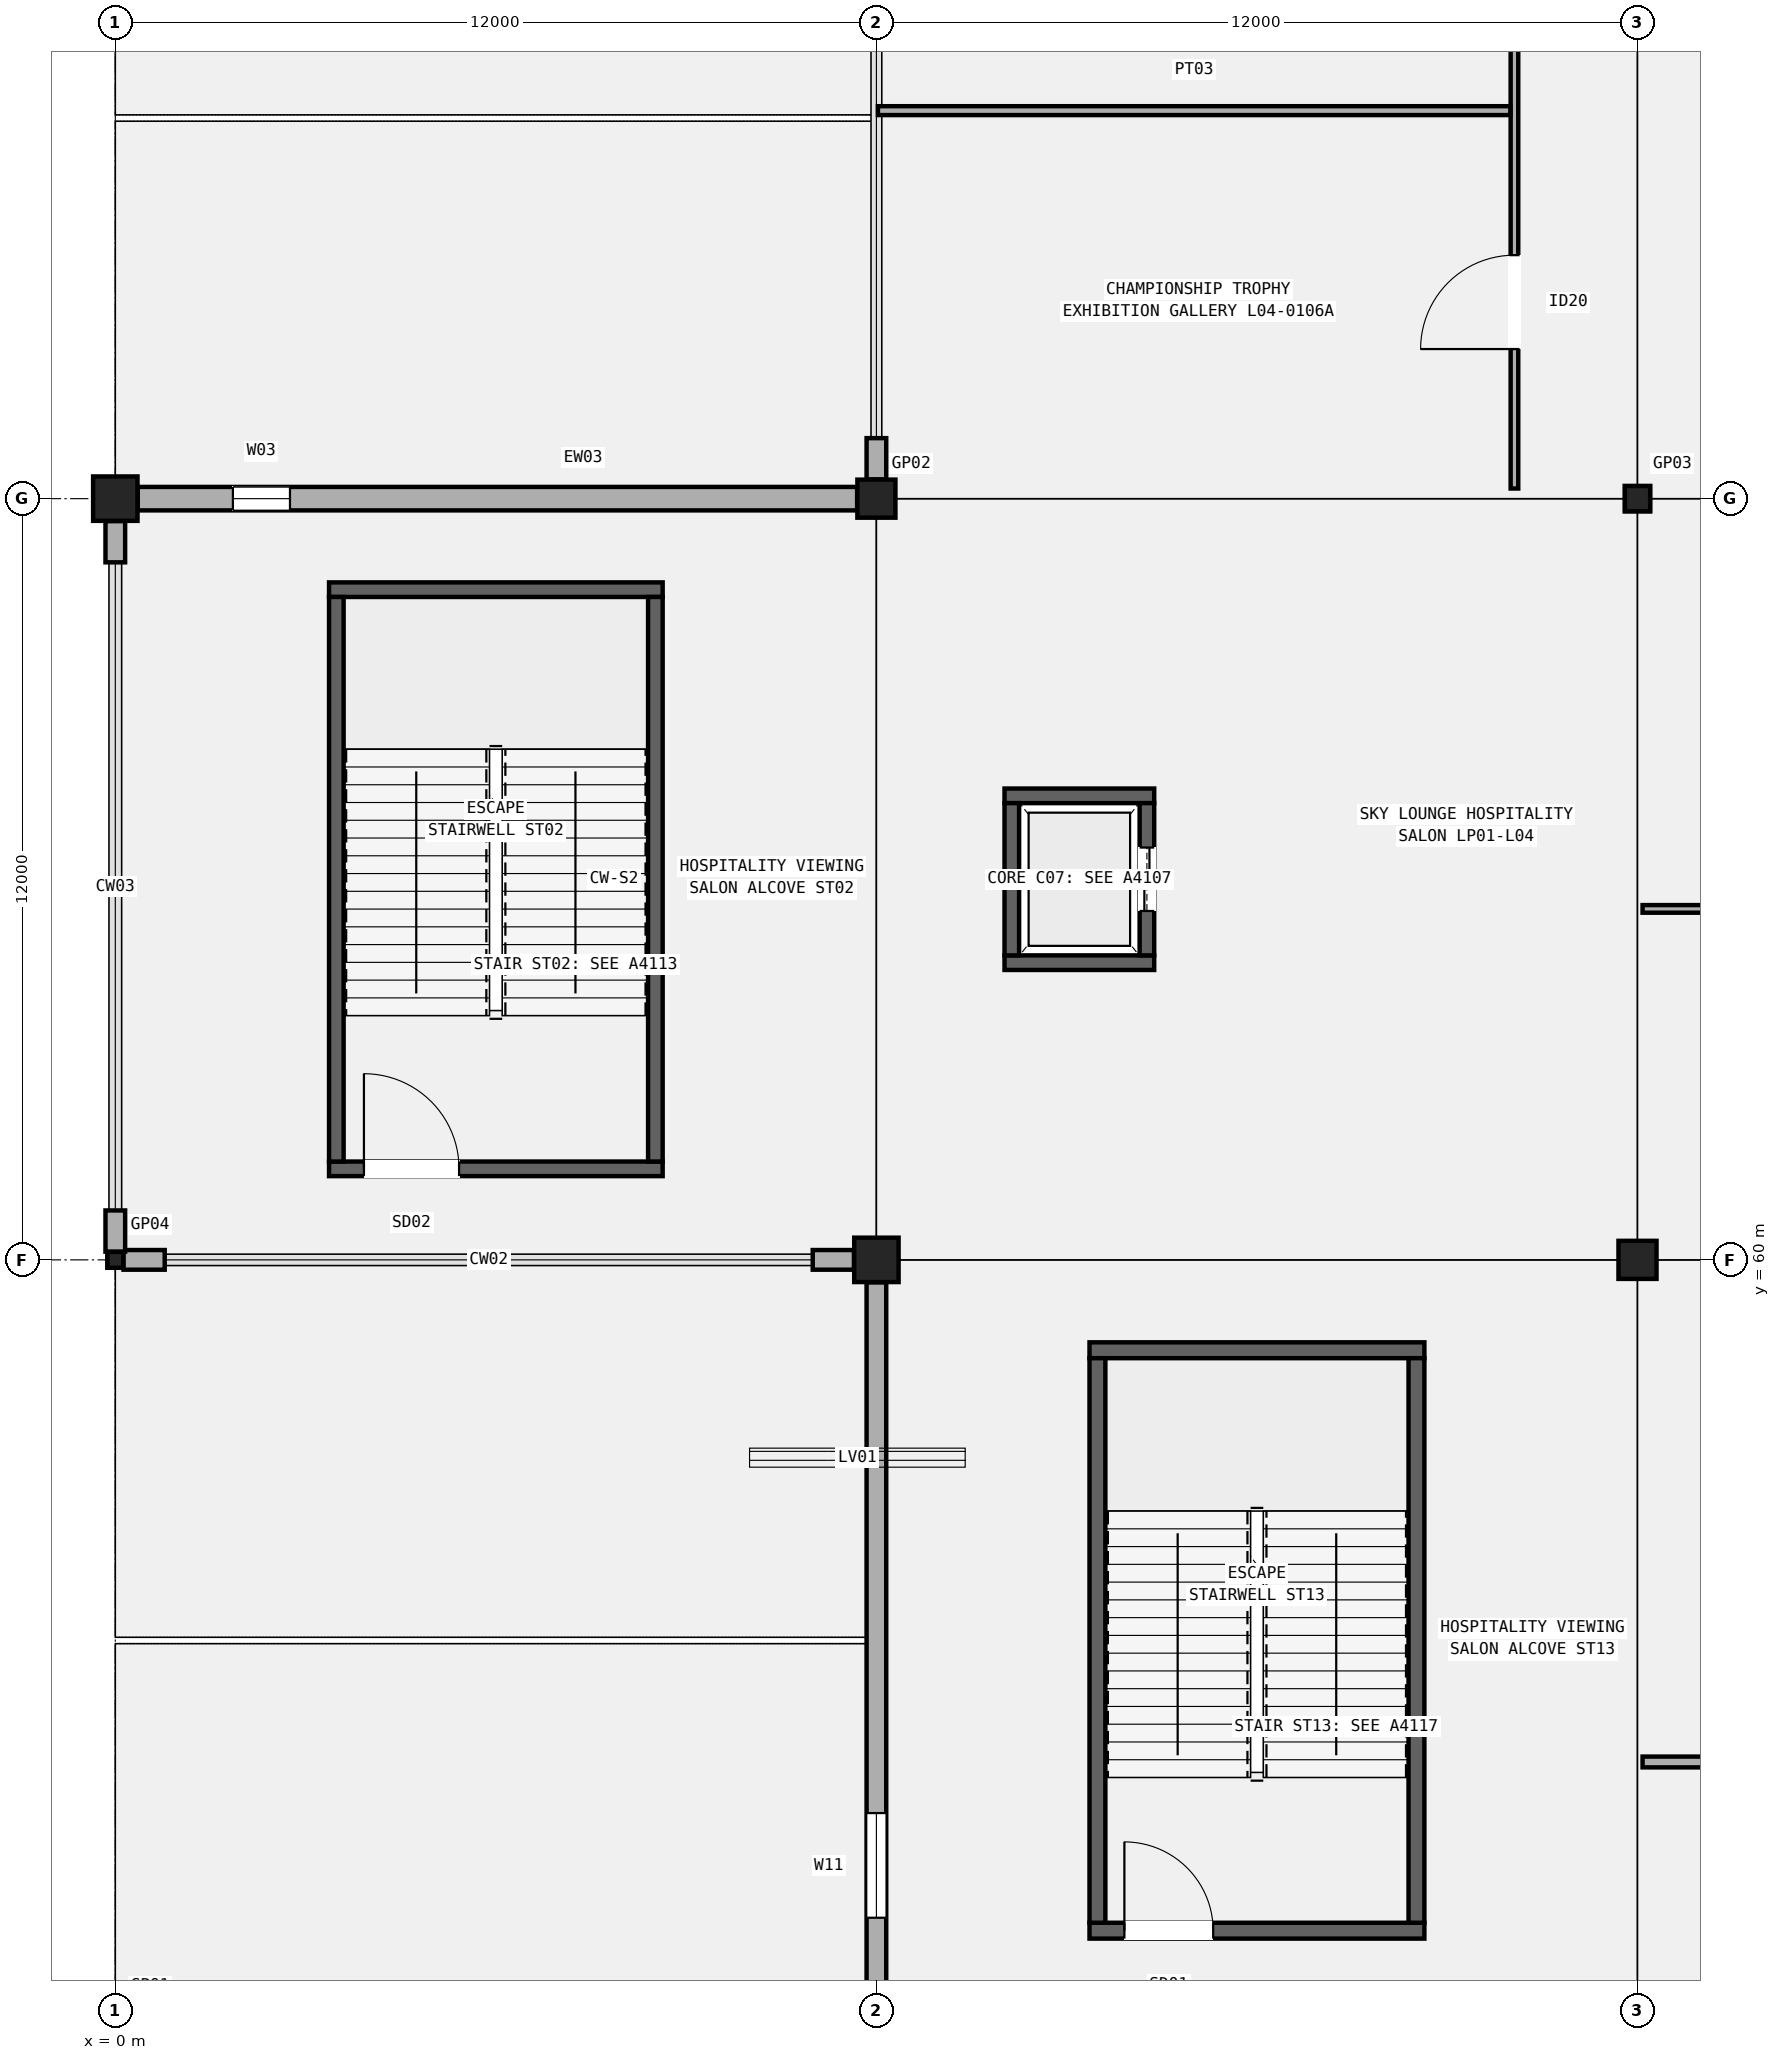
"""IFC4 building model, lengths in metres.
Left out: names, types, materials, properties, quantities, classifications, styles, units other than length and angle.
Written with IfcOpenShell. Run it as: python <this file> out.ifc"""

import sys

from ifc_helpers import new_model, si_unit, direction, frame, frame_2d, origin, origin_2d, place, context, subcontext, project, spatial, rectangle, hollow_rectangle, extrude, element, fill, save


model = new_model("IFC4")
c1 = context("Model", 3, precision=1e-05, world=origin(), true_north=direction((0.0, 1.0)))
c2 = subcontext(c1, "Body", "Model", "MODEL_VIEW")
j1 = project(units=[si_unit("LENGTHUNIT", "METRE"), si_unit("PLANEANGLEUNIT", "RADIAN")], contexts=[c1])
p1 = place(None, origin())
s1 = spatial("IfcSite", under=j1, at=p1, CompositionType="ELEMENT")
p2 = place(p1, origin())
s2 = spatial("IfcBuilding", under=s1, at=p2, CompositionType="ELEMENT")
p3 = place(p2, frame((0.0, 0.0, 20.4)))
s3 = spatial("IfcBuildingStorey", under=s2, at=p3, CompositionType="ELEMENT", Elevation=20.4)
p4 = place(p3, frame((0.0, 60.0, 0.0), z_axis=(0.0, 0.0, 1.0), x_axis=(1.0, 0.0, 0.0)))
e1 = element("IfcColumn", 1, at=p4, inside=s3, PredefinedType="COLUMN", context=c2, shape_type="SweptSolid", body=[
    extrude(hollow_rectangle(XDim=0.25, YDim=0.25, WallThickness=0.012, InnerFilletRadius=0.012, OuterFilletRadius=0.024, at=origin_2d()), origin(), (0.0, 0.0, 1.0), 5.4),
])
for number, where, z_axis, x_axis in (
    (2, (0.0, 72.0, 0.0), (0.0, 0.0, 1.0), (1.0, 0.0, 0.0)),
    (3, (12.0, 60.0, 0.0), (0.0, 0.0, 1.0), (1.0, 0.0, 0.0)),
):
    element("IfcColumn", number, at=place(p3, frame(where, z_axis=z_axis, x_axis=x_axis)), inside=s3, PredefinedType="COLUMN", context=c2, shape_type="SweptSolid", body=[
        extrude(rectangle(XDim=0.7, YDim=0.7, at=origin_2d()), origin(), (0.0, 0.0, 1.0), 5.4),
    ])
for number, where, z_axis, x_axis in (
    (4, (12.0, 72.0, 0.0), (0.0, 0.0, 1.0), (1.0, 0.0, 0.0)),
    (5, (24.0, 60.0, 0.0), (0.0, 0.0, 1.0), (1.0, 0.0, 0.0)),
):
    element("IfcColumn", number, at=place(p3, frame(where, z_axis=z_axis, x_axis=x_axis)), inside=s3, PredefinedType="COLUMN", context=c2, shape_type="SweptSolid", body=[
        extrude(rectangle(XDim=0.6, YDim=0.6, at=origin_2d()), origin(), (0.0, 0.0, 1.0), 5.4),
    ])
p5 = place(p3, frame((24.0, 72.0, 0.0), z_axis=(0.0, 0.0, 1.0), x_axis=(1.0, 0.0, 0.0)))
e6 = element("IfcColumn", 6, at=p5, inside=s3, PredefinedType="COLUMN", context=c2, shape_type="SweptSolid", body=[
    extrude(hollow_rectangle(XDim=0.4, YDim=0.4, WallThickness=0.016, InnerFilletRadius=0.016, OuterFilletRadius=0.032, at=origin_2d()), origin(), (0.0, 0.0, 1.0), 5.4),
])
p6 = place(p3, frame((0.129, 60.0, 0.0), z_axis=(0.0, 0.0, 1.0), x_axis=(1.0, 0.0, 0.0)))
e7 = element("IfcWall", 7, at=p6, inside=s3, PredefinedType="SOLIDWALL", context=c2, shape_type="SweptSolid", body=[
    extrude(rectangle(XDim=0.65, YDim=0.31, at=frame_2d((0.325, 0.0))), origin(), (0.0, 0.0, 1.0), 4.592),
])
p7 = place(p3, frame((10.996, 60.0, 0.0), z_axis=(0.0, 0.0, 1.0), x_axis=(1.0, 0.0, 0.0)))
e8 = element("IfcWall", 8, at=p7, inside=s3, PredefinedType="SOLIDWALL", context=c2, shape_type="SweptSolid", body=[
    extrude(rectangle(XDim=0.65, YDim=0.31, at=frame_2d((0.325, 0.0))), origin(), (0.0, 0.0, 1.0), 4.592),
])
p8 = place(p3, frame((0.354, 72.0, 0.0), z_axis=(0.0, 0.0, 1.0), x_axis=(1.0, 0.0, 0.0)))
e9 = element("IfcWall", 9, at=p8, inside=s3, PredefinedType="SOLIDWALL", context=c2, shape_type="SweptSolid", body=[
    extrude(rectangle(XDim=11.342, YDim=0.37, at=frame_2d((5.671, 0.0))), origin(), (0.0, 0.0, 1.0), 4.48),
])
p9 = place(p8, frame((1.5, 0.0, 0.95)))
e10 = element("IfcOpeningElement", 10, at=p9, cuts=e9, PredefinedType="OPENING", context=c2, shape_type="SweptSolid", body=[
    extrude(rectangle(XDim=0.9, YDim=2.7, at=frame_2d((0.45, 1.35))), frame((0.0, 0.195, 0.0), z_axis=(0.0, -1.0, 0.0), x_axis=(1.0, 0.0, 0.0)), (0.0, 0.0, 1.0), 0.39),
])
p10 = place(p3, frame((0.0, 60.129, 0.0), z_axis=(0.0, 0.0, 1.0), x_axis=(0.0, 1.0, 0.0)))
e11 = element("IfcWall", 11, at=p10, inside=s3, PredefinedType="SOLIDWALL", context=c2, shape_type="SweptSolid", body=[
    extrude(rectangle(XDim=0.65, YDim=0.31, at=frame_2d((0.325, 0.0))), origin(), (0.0, 0.0, 1.0), 4.592),
])
p11 = place(p3, frame((0.0, 70.996, 0.0), z_axis=(0.0, 0.0, 1.0), x_axis=(0.0, 1.0, 0.0)))
e12 = element("IfcWall", 12, at=p11, inside=s3, PredefinedType="SOLIDWALL", context=c2, shape_type="SweptSolid", body=[
    extrude(rectangle(XDim=0.65, YDim=0.31, at=frame_2d((0.325, 0.0))), origin(), (0.0, 0.0, 1.0), 4.592),
])
p12 = place(p3, frame((12.0, 48.129, 0.0), z_axis=(0.0, 0.0, 1.0), x_axis=(0.0, 1.0, 0.0)))
e13 = element("IfcWall", 13, at=p12, inside=s3, PredefinedType="SOLIDWALL", context=c2, shape_type="SweptSolid", body=[
    extrude(rectangle(XDim=11.517, YDim=0.31, at=frame_2d((5.759, 0.0))), origin(), (0.0, 0.0, 1.0), 4.592),
])
p13 = place(p12, frame((1.5, 0.0, 0.95)))
e14 = element("IfcOpeningElement", 14, at=p13, cuts=e13, PredefinedType="OPENING", context=c2, shape_type="SweptSolid", body=[
    extrude(rectangle(XDim=1.65, YDim=2.05, at=frame_2d((0.825, 1.025))), frame((0.0, 0.165, 0.0), z_axis=(0.0, -1.0, 0.0), x_axis=(1.0, 0.0, 0.0)), (0.0, 0.0, 1.0), 0.33),
])
p14 = place(p3, frame((12.0, 72.304, 0.0), z_axis=(0.0, 0.0, 1.0), x_axis=(0.0, 1.0, 0.0)))
e15 = element("IfcWall", 15, at=p14, inside=s3, PredefinedType="SOLIDWALL", context=c2, shape_type="SweptSolid", body=[
    extrude(rectangle(XDim=0.65, YDim=0.31, at=frame_2d((0.325, 0.0))), origin(), (0.0, 0.0, 1.0), 4.58),
])
p15 = place(p3, frame((3.37, 61.435, 0.0), z_axis=(0.0, 0.0, 1.0), x_axis=(1.0, 0.0, 0.0)))
e16 = element("IfcWall", 16, at=p15, inside=s3, PredefinedType="SHEAR", context=c2, shape_type="SweptSolid", body=[
    extrude(rectangle(XDim=5.26, YDim=0.23, at=frame_2d((2.63, 0.0))), origin(), (0.0, 0.0, 1.0), 5.18),
])
p16 = place(p15, frame((0.55, 0.0, 0.0)))
e17 = element("IfcOpeningElement", 17, at=p16, cuts=e16, PredefinedType="OPENING", context=c2, shape_type="SweptSolid", body=[
    extrude(rectangle(XDim=1.5, YDim=2.2, at=frame_2d((0.75, 1.1))), frame((0.0, 0.125, 0.0), z_axis=(0.0, -1.0, 0.0), x_axis=(1.0, 0.0, 0.0)), (0.0, 0.0, 1.0), 0.25),
])
p17 = place(p3, frame((3.37, 70.565, 0.0), z_axis=(0.0, 0.0, 1.0), x_axis=(1.0, 0.0, 0.0)))
e18 = element("IfcWall", 18, at=p17, inside=s3, PredefinedType="SHEAR", context=c2, shape_type="SweptSolid", body=[
    extrude(rectangle(XDim=5.26, YDim=0.23, at=frame_2d((2.63, 0.0))), origin(), (0.0, 0.0, 1.0), 5.18),
])
for number, where, z_axis, x_axis in (
    (19, (3.485, 61.55, 0.0), (0.0, 0.0, 1.0), (0.0, 1.0, 0.0)),
    (20, (8.515, 61.55, 0.0), (0.0, 0.0, 1.0), (0.0, 1.0, 0.0)),
):
    element("IfcWall", number, at=place(p3, frame(where, z_axis=z_axis, x_axis=x_axis)), inside=s3, PredefinedType="SHEAR", context=c2, shape_type="SweptSolid", body=[
        extrude(rectangle(XDim=8.9, YDim=0.23, at=frame_2d((4.45, 0.0))), origin(), (0.0, 0.0, 1.0), 5.18),
    ])
p18 = place(p3, frame((15.36, 49.425, 0.0), z_axis=(0.0, 0.0, 1.0), x_axis=(1.0, 0.0, 0.0)))
e21 = element("IfcWall", 21, at=p18, inside=s3, PredefinedType="SHEAR", context=c2, shape_type="SweptSolid", body=[
    extrude(rectangle(XDim=5.28, YDim=0.25, at=frame_2d((2.64, 0.0))), origin(), (0.0, 0.0, 1.0), 5.18),
])
p19 = place(p18, frame((0.55, 0.0, 0.0)))
e22 = element("IfcOpeningElement", 22, at=p19, cuts=e21, PredefinedType="OPENING", context=c2, shape_type="SweptSolid", body=[
    extrude(rectangle(XDim=1.4, YDim=2.15, at=frame_2d((0.7, 1.075))), frame((0.0, 0.135, 0.0), z_axis=(0.0, -1.0, 0.0), x_axis=(1.0, 0.0, 0.0)), (0.0, 0.0, 1.0), 0.27),
])
p20 = place(p3, frame((15.36, 58.575, 0.0), z_axis=(0.0, 0.0, 1.0), x_axis=(1.0, 0.0, 0.0)))
e23 = element("IfcWall", 23, at=p20, inside=s3, PredefinedType="SHEAR", context=c2, shape_type="SweptSolid", body=[
    extrude(rectangle(XDim=5.28, YDim=0.25, at=frame_2d((2.64, 0.0))), origin(), (0.0, 0.0, 1.0), 5.18),
])
for number, where, z_axis, x_axis in (
    (24, (15.485, 49.55, 0.0), (0.0, 0.0, 1.0), (0.0, 1.0, 0.0)),
    (25, (20.515, 49.55, 0.0), (0.0, 0.0, 1.0), (0.0, 1.0, 0.0)),
):
    element("IfcWall", number, at=place(p3, frame(where, z_axis=z_axis, x_axis=x_axis)), inside=s3, PredefinedType="SHEAR", context=c2, shape_type="SweptSolid", body=[
        extrude(rectangle(XDim=8.9, YDim=0.25, at=frame_2d((4.45, 0.0))), origin(), (0.0, 0.0, 1.0), 5.18),
    ])
for number, where, z_axis, x_axis in (
    (26, (14.02, 64.685, 0.0), (0.0, 0.0, 1.0), (1.0, 0.0, 0.0)),
    (27, (14.02, 67.315, 0.0), (0.0, 0.0, 1.0), (1.0, 0.0, 0.0)),
):
    element("IfcWall", number, at=place(p3, frame(where, z_axis=z_axis, x_axis=x_axis)), inside=s3, PredefinedType="SHEAR", context=c2, shape_type="SweptSolid", body=[
        extrude(rectangle(XDim=2.36, YDim=0.23, at=frame_2d((1.18, 0.0))), origin(), (0.0, 0.0, 1.0), 5.18),
    ])
p21 = place(p3, frame((14.135, 64.8, 0.0), z_axis=(0.0, 0.0, 1.0), x_axis=(0.0, 1.0, 0.0)))
e28 = element("IfcWall", 28, at=p21, inside=s3, PredefinedType="SHEAR", context=c2, shape_type="SweptSolid", body=[
    extrude(rectangle(XDim=2.4, YDim=0.23, at=frame_2d((1.2, 0.0))), origin(), (0.0, 0.0, 1.0), 5.18),
])
p22 = place(p3, frame((16.265, 64.8, 0.0), z_axis=(0.0, 0.0, 1.0), x_axis=(0.0, 1.0, 0.0)))
e29 = element("IfcWall", 29, at=p22, inside=s3, PredefinedType="SHEAR", context=c2, shape_type="SweptSolid", body=[
    extrude(rectangle(XDim=2.4, YDim=0.23, at=frame_2d((1.2, 0.0))), origin(), (0.0, 0.0, 1.0), 5.18),
])
p23 = place(p22, frame((0.7, 0.0, 0.0)))
e30 = element("IfcOpeningElement", 30, at=p23, cuts=e29, PredefinedType="OPENING", context=c2, shape_type="SweptSolid", body=[
    extrude(rectangle(XDim=1.0, YDim=2.15, at=frame_2d((0.5, 1.075))), frame((0.0, 0.125, 0.0), z_axis=(0.0, -1.0, 0.0), x_axis=(1.0, 0.0, 0.0)), (0.0, 0.0, 1.0), 0.25),
])
p24 = place(p3, frame((22.06, 72.16, 0.0), z_axis=(0.0, 0.0, 1.0), x_axis=(0.0, 1.0, 0.0)))
e31 = element("IfcWall", 31, at=p24, inside=s3, PredefinedType="PARTITIONING", context=c2, shape_type="SweptSolid", body=[
    extrude(rectangle(XDim=11.68, YDim=0.12, at=frame_2d((5.84, 0.0))), origin(), (0.0, 0.0, 1.0), 4.52),
])
p25 = place(p24, frame((2.198, 0.0, 0.0)))
e32 = element("IfcOpeningElement", 32, at=p25, cuts=e31, PredefinedType="OPENING", context=c2, shape_type="SweptSolid", body=[
    extrude(rectangle(XDim=1.48, YDim=2.24, at=frame_2d((0.74, 1.12))), frame((0.0, 0.07, 0.0), z_axis=(0.0, -1.0, 0.0), x_axis=(1.0, 0.0, 0.0)), (0.0, 0.0, 1.0), 0.14),
])
p26 = place(p24, frame((8.098, 0.0, 0.0)))
e33 = element("IfcOpeningElement", 33, at=p26, cuts=e31, PredefinedType="OPENING", context=c2, shape_type="SweptSolid", body=[
    extrude(rectangle(XDim=1.52, YDim=2.28, at=frame_2d((0.76, 1.14))), frame((0.0, 0.07, 0.0), z_axis=(0.0, -1.0, 0.0), x_axis=(1.0, 0.0, 0.0)), (0.0, 0.0, 1.0), 0.14),
])
p27 = place(p3, frame((12.024, 78.117, 0.0), z_axis=(0.0, 0.0, 1.0), x_axis=(1.0, 0.0, 0.0)))
e34 = element("IfcWall", 34, at=p27, inside=s3, PredefinedType="PARTITIONING", context=c2, shape_type="SweptSolid", body=[
    extrude(rectangle(XDim=9.971, YDim=0.14, at=frame_2d((4.986, 0.0))), origin(), (0.0, 0.0, 1.0), 4.52),
])
p28 = place(p3, frame((24.08, 52.084, 0.0), z_axis=(0.0, 0.0, 1.0), x_axis=(1.0, 0.0, 0.0)))
e35 = element("IfcWall", 35, at=p28, inside=s3, PredefinedType="PARTITIONING", context=c2, shape_type="SweptSolid", body=[
    extrude(rectangle(XDim=10.4, YDim=0.17, at=frame_2d((5.2, 0.0))), origin(), (0.0, 0.0, 1.0), 4.52),
])
p29 = place(p3, frame((24.08, 65.533, 0.0), z_axis=(0.0, 0.0, 1.0), x_axis=(1.0, 0.0, 0.0)))
e36 = element("IfcWall", 36, at=p29, inside=s3, PredefinedType="PARTITIONING", context=c2, shape_type="SweptSolid", body=[
    extrude(rectangle(XDim=10.42, YDim=0.12, at=frame_2d((5.21, 0.0))), origin(), (0.0, 0.0, 1.0), 4.52),
])
p30 = place(p9, origin())
e37 = element("IfcWindow", 37, at=p30, inside=s3, PartitioningType="SINGLE_PANEL", PredefinedType="WINDOW", context=c2, shape_type="SweptSolid", body=[
    extrude(rectangle(XDim=0.9, YDim=2.7, at=frame_2d((0.45, 1.35))), frame((0.0, 0.03, 0.0), z_axis=(0.0, -1.0, 0.0), x_axis=(1.0, 0.0, 0.0)), (0.0, 0.0, 1.0), 0.06),
])
fill(e10, e37)
p31 = place(p13, origin())
e38 = element("IfcWindow", 38, at=p31, inside=s3, PartitioningType="SINGLE_PANEL", PredefinedType="WINDOW", context=c2, shape_type="SweptSolid", body=[
    extrude(rectangle(XDim=1.65, YDim=2.05, at=frame_2d((0.825, 1.025))), frame((0.0, 0.03, 0.0), z_axis=(0.0, -1.0, 0.0), x_axis=(1.0, 0.0, 0.0)), (0.0, 0.0, 1.0), 0.06),
])
fill(e14, e38)
p32 = place(p16, origin())
e39 = element("IfcDoor", 39, at=p32, inside=s3, OperationType="SINGLE_SWING_LEFT", PredefinedType="DOOR", context=c2, shape_type="SweptSolid", body=[
    extrude(rectangle(XDim=1.5, YDim=2.2, at=frame_2d((0.75, 1.1))), frame((0.0, 0.025, 0.0), z_axis=(0.0, -1.0, 0.0), x_axis=(1.0, 0.0, 0.0)), (0.0, 0.0, 1.0), 0.05),
])
fill(e17, e39)
p33 = place(p19, origin())
e40 = element("IfcDoor", 40, at=p33, inside=s3, OperationType="SINGLE_SWING_LEFT", PredefinedType="DOOR", context=c2, shape_type="SweptSolid", body=[
    extrude(rectangle(XDim=1.4, YDim=2.15, at=frame_2d((0.7, 1.075))), frame((0.0, 0.025, 0.0), z_axis=(0.0, -1.0, 0.0), x_axis=(1.0, 0.0, 0.0)), (0.0, 0.0, 1.0), 0.05),
])
fill(e22, e40)
p34 = place(p23, origin())
e41 = element("IfcDoor", 41, at=p34, inside=s3, OperationType="DOUBLE_DOOR_SLIDING", PredefinedType="DOOR", context=c2, shape_type="SweptSolid", body=[
    extrude(rectangle(XDim=1.0, YDim=2.15, at=frame_2d((0.5, 1.075))), frame((0.0, 0.025, 0.0), z_axis=(0.0, -1.0, 0.0), x_axis=(1.0, 0.0, 0.0)), (0.0, 0.0, 1.0), 0.05),
])
fill(e30, e41)
p35 = place(p25, origin())
e42 = element("IfcDoor", 42, at=p35, inside=s3, OperationType="SINGLE_SWING_LEFT", PredefinedType="DOOR", context=c2, shape_type="SweptSolid", body=[
    extrude(rectangle(XDim=1.48, YDim=2.24, at=frame_2d((0.74, 1.12))), frame((0.0, 0.025, 0.0), z_axis=(0.0, -1.0, 0.0), x_axis=(1.0, 0.0, 0.0)), (0.0, 0.0, 1.0), 0.05),
])
fill(e32, e42)
save(model, sys.argv[1])
